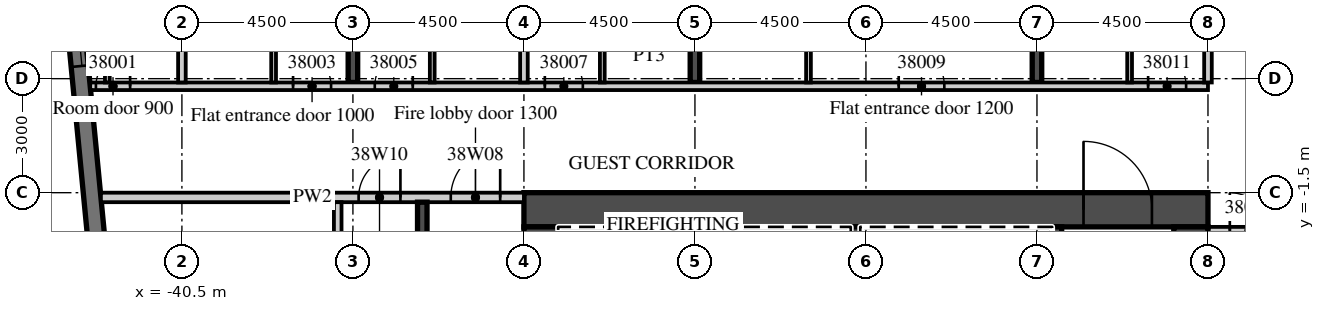
"""IFC4 building model, lengths in metres.
Left out: names, types, materials, properties, quantities, classifications, styles, units other than length and angle.
Written with IfcOpenShell. Run it as: python <this file> out.ifc"""

import sys

from ifc_helpers import new_model, si_unit, direction, frame, frame_2d, origin, place, context, subcontext, project, spatial, rectangle, extrude, element, fill, save


model = new_model("IFC4")
c1 = context("Model", 3, precision=1e-05, world=origin(), true_north=direction((0.0, 1.0)))
c2 = subcontext(c1, "Body", "Model", "MODEL_VIEW")
j1 = project(units=[si_unit("LENGTHUNIT", "METRE"), si_unit("PLANEANGLEUNIT", "RADIAN")], contexts=[c1])
p1 = place(None, origin())
s1 = spatial("IfcSite", under=j1, at=p1, CompositionType="ELEMENT")
p2 = place(p1, origin())
s2 = spatial("IfcBuilding", under=s1, at=p2, CompositionType="ELEMENT")
p3 = place(p2, frame((0.0, 0.0, 166.9)))
s3 = spatial("IfcBuildingStorey", under=s2, at=p3, CompositionType="ELEMENT", Elevation=166.9)
p4 = place(p3, frame((-36.0, 1.4, 0.0), z_axis=(0.0, 0.0, 1.0), x_axis=(0.0, 1.0, 0.0)))
e1 = element("IfcWall", 1, at=p4, inside=s3, PredefinedType="SHEAR", context=c2, shape_type="SweptSolid", body=[
    extrude(rectangle(XDim=15.401, YDim=0.25, at=frame_2d((7.701, 0.0))), origin(), (0.0, 0.0, 1.0), 3.3),
])
p5 = place(p3, frame((-27.0, 1.4, 0.0), z_axis=(0.0, 0.0, 1.0), x_axis=(0.0, 1.0, 0.0)))
e2 = element("IfcWall", 2, at=p5, inside=s3, PredefinedType="SHEAR", context=c2, shape_type="SweptSolid", body=[
    extrude(rectangle(XDim=16.268, YDim=0.25, at=frame_2d((8.134, 0.0))), origin(), (0.0, 0.0, 1.0), 3.3),
])
p6 = place(p3, frame((-18.0, 1.4, 0.0), z_axis=(0.0, 0.0, 1.0), x_axis=(0.0, 1.0, 0.0)))
e3 = element("IfcWall", 3, at=p6, inside=s3, PredefinedType="SHEAR", context=c2, shape_type="SweptSolid", body=[
    extrude(rectangle(XDim=17.134, YDim=0.25, at=frame_2d((8.567, 0.0))), origin(), (0.0, 0.0, 1.0), 3.3),
])
p7 = place(p3, frame((-44.214, 12.466, 0.0), z_axis=(0.0, 0.0, 1.0), x_axis=(0.095847314626, -0.995396047952, 0.0)))
e4 = element("IfcWall", 4, at=p7, inside=s3, PredefinedType="SOLIDWALL", context=c2, shape_type="SweptSolid", body=[
    extrude(rectangle(XDim=34.0, YDim=0.45, at=frame_2d((17.0, 0.0))), origin(), (0.0, 0.0, 1.0), 3.02),
])
p8 = place(p7, frame((2.865, 0.0, 0.45)))
e5 = element("IfcOpeningElement", 5, at=p8, cuts=e4, PredefinedType="OPENING", context=c2, shape_type="SweptSolid", body=[
    extrude(rectangle(XDim=3.3, YDim=2.25, at=frame_2d((1.65, 1.125))), frame((0.0, 0.235, 0.0), z_axis=(0.0, -1.0, 0.0), x_axis=(1.0, 0.0, 0.0)), (0.0, 0.0, 1.0), 0.47),
])
p9 = place(p7, frame((7.386, 0.0, 0.45)))
e6 = element("IfcOpeningElement", 6, at=p9, cuts=e4, PredefinedType="OPENING", context=c2, shape_type="SweptSolid", body=[
    extrude(rectangle(XDim=3.3, YDim=2.25, at=frame_2d((1.65, 1.125))), frame((0.0, 0.235, 0.0), z_axis=(0.0, -1.0, 0.0), x_axis=(1.0, 0.0, 0.0)), (0.0, 0.0, 1.0), 0.47),
])
p10 = place(p3, frame((-42.913, 1.3, 0.0), z_axis=(0.0, 0.0, 1.0), x_axis=(1.0, 0.0, 0.0)))
e7 = element("IfcWall", 7, at=p10, inside=s3, PredefinedType="PARTITIONING", context=c2, shape_type="SweptSolid", body=[
    extrude(rectangle(XDim=29.413, YDim=0.2, at=frame_2d((14.707, 0.0))), origin(), (0.0, 0.0, 1.0), 3.02),
])
p11 = place(p10, frame((0.15, 0.0, 0.0)))
e8 = element("IfcOpeningElement", 8, at=p11, cuts=e7, PredefinedType="OPENING", context=c2, shape_type="SweptSolid", body=[
    extrude(rectangle(XDim=0.9, YDim=2.1, at=frame_2d((0.45, 1.05))), frame((0.0, 0.11, 0.0), z_axis=(0.0, -1.0, 0.0), x_axis=(1.0, 0.0, 0.0)), (0.0, 0.0, 1.0), 0.22),
])
p12 = place(p10, frame((5.338, 0.0, 0.0)))
e9 = element("IfcOpeningElement", 9, at=p12, cuts=e7, PredefinedType="OPENING", context=c2, shape_type="SweptSolid", body=[
    extrude(rectangle(XDim=1.0, YDim=2.1, at=frame_2d((0.5, 1.05))), frame((0.0, 0.11, 0.0), z_axis=(0.0, -1.0, 0.0), x_axis=(1.0, 0.0, 0.0)), (0.0, 0.0, 1.0), 0.22),
])
p13 = place(p10, frame((7.488, 0.0, 0.0)))
e10 = element("IfcOpeningElement", 10, at=p13, cuts=e7, PredefinedType="OPENING", context=c2, shape_type="SweptSolid", body=[
    extrude(rectangle(XDim=1.0, YDim=2.1, at=frame_2d((0.5, 1.05))), frame((0.0, 0.11, 0.0), z_axis=(0.0, -1.0, 0.0), x_axis=(1.0, 0.0, 0.0)), (0.0, 0.0, 1.0), 0.22),
])
p14 = place(p10, frame((11.963, 0.0, 0.0)))
e11 = element("IfcOpeningElement", 11, at=p14, cuts=e7, PredefinedType="OPENING", context=c2, shape_type="SweptSolid", body=[
    extrude(rectangle(XDim=1.0, YDim=2.1, at=frame_2d((0.5, 1.05))), frame((0.0, 0.11, 0.0), z_axis=(0.0, -1.0, 0.0), x_axis=(1.0, 0.0, 0.0)), (0.0, 0.0, 1.0), 0.22),
])
p15 = place(p10, frame((21.275, 0.0, 0.0)))
e12 = element("IfcOpeningElement", 12, at=p15, cuts=e7, PredefinedType="OPENING", context=c2, shape_type="SweptSolid", body=[
    extrude(rectangle(XDim=1.2, YDim=2.1, at=frame_2d((0.6, 1.05))), frame((0.0, 0.11, 0.0), z_axis=(0.0, -1.0, 0.0), x_axis=(1.0, 0.0, 0.0)), (0.0, 0.0, 1.0), 0.22),
])
p16 = place(p10, frame((27.838, 0.0, 0.0)))
e13 = element("IfcOpeningElement", 13, at=p16, cuts=e7, PredefinedType="OPENING", context=c2, shape_type="SweptSolid", body=[
    extrude(rectangle(XDim=1.0, YDim=2.1, at=frame_2d((0.5, 1.05))), frame((0.0, 0.11, 0.0), z_axis=(0.0, -1.0, 0.0), x_axis=(1.0, 0.0, 0.0)), (0.0, 0.0, 1.0), 0.22),
])
p17 = place(p3, frame((-40.5, 1.4, 0.0), z_axis=(0.0, 0.0, 1.0), x_axis=(0.0, 1.0, 0.0)))
e14 = element("IfcWall", 14, at=p17, inside=s3, PredefinedType="PARTITIONING", context=c2, shape_type="SweptSolid", body=[
    extrude(rectangle(XDim=14.99, YDim=0.2, at=frame_2d((7.495, 0.0))), origin(), (0.0, 0.0, 1.0), 3.02),
])
p18 = place(p3, frame((-42.462, 1.4, 0.0), z_axis=(0.0, 0.0, 1.0), x_axis=(0.0, 1.0, 0.0)))
e15 = element("IfcWall", 15, at=p18, inside=s3, PredefinedType="PARTITIONING", context=c2, shape_type="SweptSolid", body=[
    extrude(rectangle(XDim=4.028, YDim=0.125, at=frame_2d((2.014, 0.0))), origin(), (0.0, 0.0, 1.0), 3.02),
])
p19 = place(p18, frame((2.45, 0.0, 0.0)))
e16 = element("IfcOpeningElement", 16, at=p19, cuts=e15, PredefinedType="OPENING", context=c2, shape_type="SweptSolid", body=[
    extrude(rectangle(XDim=0.9, YDim=2.1, at=frame_2d((0.45, 1.05))), frame((0.0, 0.073, 0.0), z_axis=(0.0, -1.0, 0.0), x_axis=(1.0, 0.0, 0.0)), (0.0, 0.0, 1.0), 0.145),
])
p20 = place(p3, frame((-38.087, 1.4, 0.0), z_axis=(0.0, 0.0, 1.0), x_axis=(0.0, 1.0, 0.0)))
e17 = element("IfcWall", 17, at=p20, inside=s3, PredefinedType="PARTITIONING", context=c2, shape_type="SweptSolid", body=[
    extrude(rectangle(XDim=5.725, YDim=0.125, at=frame_2d((2.863, 0.0))), origin(), (0.0, 0.0, 1.0), 3.02),
])
p21 = place(p20, frame((2.45, 0.0, 0.0)))
e18 = element("IfcOpeningElement", 18, at=p21, cuts=e17, PredefinedType="OPENING", context=c2, shape_type="SweptSolid", body=[
    extrude(rectangle(XDim=0.9, YDim=2.1, at=frame_2d((0.45, 1.05))), frame((0.0, 0.073, 0.0), z_axis=(0.0, -1.0, 0.0), x_axis=(1.0, 0.0, 0.0)), (0.0, 0.0, 1.0), 0.145),
])
p22 = place(p3, frame((-31.5, 1.4, 0.0), z_axis=(0.0, 0.0, 1.0), x_axis=(0.0, 1.0, 0.0)))
e19 = element("IfcWall", 19, at=p22, inside=s3, PredefinedType="PARTITIONING", context=c2, shape_type="SweptSolid", body=[
    extrude(rectangle(XDim=15.856, YDim=0.2, at=frame_2d((7.928, 0.0))), origin(), (0.0, 0.0, 1.0), 3.02),
])
p23 = place(p3, frame((-33.913, 1.4, 0.0), z_axis=(0.0, 0.0, 1.0), x_axis=(0.0, 1.0, 0.0)))
e20 = element("IfcWall", 20, at=p23, inside=s3, PredefinedType="PARTITIONING", context=c2, shape_type="SweptSolid", body=[
    extrude(rectangle(XDim=5.725, YDim=0.125, at=frame_2d((2.863, 0.0))), origin(), (0.0, 0.0, 1.0), 3.02),
])
p24 = place(p23, frame((2.45, 0.0, 0.0)))
e21 = element("IfcOpeningElement", 21, at=p24, cuts=e20, PredefinedType="OPENING", context=c2, shape_type="SweptSolid", body=[
    extrude(rectangle(XDim=0.9, YDim=2.1, at=frame_2d((0.45, 1.05))), frame((0.0, 0.073, 0.0), z_axis=(0.0, -1.0, 0.0), x_axis=(1.0, 0.0, 0.0)), (0.0, 0.0, 1.0), 0.145),
])
p25 = place(p3, frame((-29.438, 1.4, 0.0), z_axis=(0.0, 0.0, 1.0), x_axis=(0.0, 1.0, 0.0)))
e22 = element("IfcWall", 22, at=p25, inside=s3, PredefinedType="PARTITIONING", context=c2, shape_type="SweptSolid", body=[
    extrude(rectangle(XDim=5.725, YDim=0.125, at=frame_2d((2.863, 0.0))), origin(), (0.0, 0.0, 1.0), 3.02),
])
p26 = place(p25, frame((2.45, 0.0, 0.0)))
e23 = element("IfcOpeningElement", 23, at=p26, cuts=e22, PredefinedType="OPENING", context=c2, shape_type="SweptSolid", body=[
    extrude(rectangle(XDim=0.9, YDim=2.1, at=frame_2d((0.45, 1.05))), frame((0.0, 0.073, 0.0), z_axis=(0.0, -1.0, 0.0), x_axis=(1.0, 0.0, 0.0)), (0.0, 0.0, 1.0), 0.145),
])
p27 = place(p3, frame((-24.012, 1.4, 0.0), z_axis=(0.0, 0.0, 1.0), x_axis=(0.0, 1.0, 0.0)))
e24 = element("IfcWall", 24, at=p27, inside=s3, PredefinedType="PARTITIONING", context=c2, shape_type="SweptSolid", body=[
    extrude(rectangle(XDim=5.725, YDim=0.125, at=frame_2d((2.863, 0.0))), origin(), (0.0, 0.0, 1.0), 3.02),
])
p28 = place(p27, frame((2.45, 0.0, 0.0)))
e25 = element("IfcOpeningElement", 25, at=p28, cuts=e24, PredefinedType="OPENING", context=c2, shape_type="SweptSolid", body=[
    extrude(rectangle(XDim=0.9, YDim=2.1, at=frame_2d((0.45, 1.05))), frame((0.0, 0.073, 0.0), z_axis=(0.0, -1.0, 0.0), x_axis=(1.0, 0.0, 0.0)), (0.0, 0.0, 1.0), 0.145),
])
p29 = place(p3, frame((-13.5, 1.4, 0.0), z_axis=(0.0, 0.0, 1.0), x_axis=(0.0, 1.0, 0.0)))
e26 = element("IfcWall", 26, at=p29, inside=s3, PredefinedType="PARTITIONING", context=c2, shape_type="SweptSolid", body=[
    extrude(rectangle(XDim=17.59, YDim=0.2, at=frame_2d((8.795, 0.0))), origin(), (0.0, 0.0, 1.0), 3.02),
])
p30 = place(p3, frame((-15.562, 1.4, 0.0), z_axis=(0.0, 0.0, 1.0), x_axis=(0.0, 1.0, 0.0)))
e27 = element("IfcWall", 27, at=p30, inside=s3, PredefinedType="PARTITIONING", context=c2, shape_type="SweptSolid", body=[
    extrude(rectangle(XDim=5.725, YDim=0.125, at=frame_2d((2.863, 0.0))), origin(), (0.0, 0.0, 1.0), 3.02),
])
p31 = place(p30, frame((2.45, 0.0, 0.0)))
e28 = element("IfcOpeningElement", 28, at=p31, cuts=e27, PredefinedType="OPENING", context=c2, shape_type="SweptSolid", body=[
    extrude(rectangle(XDim=0.9, YDim=2.1, at=frame_2d((0.45, 1.05))), frame((0.0, 0.073, 0.0), z_axis=(0.0, -1.0, 0.0), x_axis=(1.0, 0.0, 0.0)), (0.0, 0.0, 1.0), 0.145),
])
p32 = place(p3, frame((-13.5, -2.5, 0.0), z_axis=(0.0, 0.0, 1.0), x_axis=(1.0, 0.0, 0.0)))
e29 = element("IfcWall", 29, at=p32, inside=s3, PredefinedType="PARTITIONING", context=c2, shape_type="SweptSolid", body=[
    extrude(rectangle(XDim=27.0, YDim=0.2, at=frame_2d((13.5, 0.0))), origin(), (0.0, 0.0, 1.0), 3.02),
])
p33 = place(p32, frame((0.575, 0.0, 0.0)))
e30 = element("IfcOpeningElement", 30, at=p33, cuts=e29, PredefinedType="OPENING", context=c2, shape_type="SweptSolid", body=[
    extrude(rectangle(XDim=1.0, YDim=2.1, at=frame_2d((0.5, 1.05))), frame((0.0, 0.11, 0.0), z_axis=(0.0, -1.0, 0.0), x_axis=(1.0, 0.0, 0.0)), (0.0, 0.0, 1.0), 0.22),
])
p34 = place(p32, frame((9.863, 0.0, 0.0)))
e31 = element("IfcOpeningElement", 31, at=p34, cuts=e29, PredefinedType="OPENING", context=c2, shape_type="SweptSolid", body=[
    extrude(rectangle(XDim=1.2, YDim=2.1, at=frame_2d((0.6, 1.05))), frame((0.0, 0.11, 0.0), z_axis=(0.0, -1.0, 0.0), x_axis=(1.0, 0.0, 0.0)), (0.0, 0.0, 1.0), 0.22),
])
p35 = place(p32, frame((15.938, 0.0, 0.0)))
e32 = element("IfcOpeningElement", 32, at=p35, cuts=e29, PredefinedType="OPENING", context=c2, shape_type="SweptSolid", body=[
    extrude(rectangle(XDim=1.2, YDim=2.1, at=frame_2d((0.6, 1.05))), frame((0.0, 0.11, 0.0), z_axis=(0.0, -1.0, 0.0), x_axis=(1.0, 0.0, 0.0)), (0.0, 0.0, 1.0), 0.22),
])
p36 = place(p32, frame((23.075, 0.0, 0.0)))
e33 = element("IfcOpeningElement", 33, at=p36, cuts=e29, PredefinedType="OPENING", context=c2, shape_type="SweptSolid", body=[
    extrude(rectangle(XDim=1.0, YDim=2.1, at=frame_2d((0.5, 1.05))), frame((0.0, 0.11, 0.0), z_axis=(0.0, -1.0, 0.0), x_axis=(1.0, 0.0, 0.0)), (0.0, 0.0, 1.0), 0.22),
])
p37 = place(p3, frame((-31.5, -1.95, 0.0), z_axis=(0.0, 0.0, 1.0), x_axis=(1.0, 0.0, 0.0)))
e34 = element("IfcWall", 34, at=p37, inside=s3, PredefinedType="SHEAR", context=c2, shape_type="SweptSolid", body=[
    extrude(rectangle(XDim=18.0, YDim=0.9, at=frame_2d((9.0, 0.0))), origin(), (0.0, 0.0, 1.0), 3.02),
])
p38 = place(p37, frame((14.725, 0.0, 0.0)))
e35 = element("IfcOpeningElement", 35, at=p38, cuts=e34, PredefinedType="OPENING", context=c2, shape_type="SweptSolid", body=[
    extrude(rectangle(XDim=1.8, YDim=2.1, at=frame_2d((0.9, 1.05))), frame((0.0, 0.46, 0.0), z_axis=(0.0, -1.0, 0.0), x_axis=(1.0, 0.0, 0.0)), (0.0, 0.0, 1.0), 0.92),
])
p39 = place(p3, frame((-31.05, -15.2, 0.0), z_axis=(0.0, 0.0, 1.0), x_axis=(0.0, 1.0, 0.0)))
e36 = element("IfcWall", 36, at=p39, inside=s3, PredefinedType="SHEAR", context=c2, shape_type="SweptSolid", body=[
    extrude(rectangle(XDim=12.8, YDim=0.9, at=frame_2d((6.4, 0.0))), origin(), (0.0, 0.0, 1.0), 3.02),
])
p40 = place(p39, frame((11.5, 0.0, 0.0)))
e37 = element("IfcOpeningElement", 37, at=p40, cuts=e36, PredefinedType="OPENING", context=c2, shape_type="SweptSolid", body=[
    extrude(rectangle(XDim=1.1, YDim=2.1, at=frame_2d((0.55, 1.05))), frame((0.0, 0.46, 0.0), z_axis=(0.0, -1.0, 0.0), x_axis=(1.0, 0.0, 0.0)), (0.0, 0.0, 1.0), 0.92),
])
p41 = place(p3, frame((-13.95, -14.6, 0.0), z_axis=(0.0, 0.0, 1.0), x_axis=(0.0, 1.0, 0.0)))
e38 = element("IfcWall", 38, at=p41, inside=s3, PredefinedType="SHEAR", context=c2, shape_type="SweptSolid", body=[
    extrude(rectangle(XDim=12.2, YDim=0.9, at=frame_2d((6.1, 0.0))), origin(), (0.0, 0.0, 1.0), 3.02),
])
p42 = place(p3, frame((-17.475, -5.55, 0.0), z_axis=(0.0, 0.0, 1.0), x_axis=(0.0, 1.0, 0.0)))
e39 = element("IfcWall", 39, at=p42, inside=s3, PredefinedType="SHEAR", context=c2, shape_type="SweptSolid", body=[
    extrude(rectangle(XDim=3.15, YDim=0.25, at=frame_2d((1.575, 0.0))), origin(), (0.0, 0.0, 1.0), 3.02),
])
for number, where, z_axis, x_axis in (
    (40, (-27.975, -5.3, 0.0), (0.0, 0.0, 1.0), (0.0, 1.0, 0.0)),
    (41, (-22.775, -5.3, 0.0), (0.0, 0.0, 1.0), (0.0, 1.0, 0.0)),
):
    element("IfcWall", number, at=place(p3, frame(where, z_axis=z_axis, x_axis=x_axis)), inside=s3, PredefinedType="SHEAR", context=c2, shape_type="SweptSolid", body=[
        extrude(rectangle(XDim=2.9, YDim=0.25, at=frame_2d((1.45, 0.0))), origin(), (0.0, 0.0, 1.0), 3.02),
    ])
p43 = place(p3, frame((-42.632, -1.625, 0.0), z_axis=(0.0, 0.0, 1.0), x_axis=(1.0, 0.0, 0.0)))
e42 = element("IfcWall", 42, at=p43, inside=s3, PredefinedType="PARTITIONING", context=c2, shape_type="SweptSolid", body=[
    extrude(rectangle(XDim=11.132, YDim=0.25, at=frame_2d((5.566, 0.0))), origin(), (0.0, 0.0, 1.0), 3.02),
])
p44 = place(p43, frame((9.207, 0.0, 0.0)))
e43 = element("IfcOpeningElement", 43, at=p44, cuts=e42, PredefinedType="OPENING", context=c2, shape_type="SweptSolid", body=[
    extrude(rectangle(XDim=1.3, YDim=2.1, at=frame_2d((0.65, 1.05))), frame((0.0, 0.135, 0.0), z_axis=(0.0, -1.0, 0.0), x_axis=(1.0, 0.0, 0.0)), (0.0, 0.0, 1.0), 0.27),
])
p45 = place(p43, frame((6.781, 0.0, 0.0)))
e44 = element("IfcOpeningElement", 44, at=p45, cuts=e42, PredefinedType="OPENING", context=c2, shape_type="SweptSolid", body=[
    extrude(rectangle(XDim=1.1, YDim=2.1, at=frame_2d((0.55, 1.05))), frame((0.0, 0.135, 0.0), z_axis=(0.0, -1.0, 0.0), x_axis=(1.0, 0.0, 0.0)), (0.0, 0.0, 1.0), 0.27),
])
p46 = place(p3, frame((-34.175, -10.1, 0.0), z_axis=(0.0, 0.0, 1.0), x_axis=(0.0, 1.0, 0.0)))
e45 = element("IfcWall", 45, at=p46, inside=s3, PredefinedType="SHEAR", context=c2, shape_type="SweptSolid", body=[
    extrude(rectangle(XDim=8.35, YDim=0.25, at=frame_2d((4.175, 0.0))), origin(), (0.0, 0.0, 1.0), 3.02),
])
p47 = place(p3, frame((-36.4, -17.7, 0.0), z_axis=(0.0, 0.0, 1.0), x_axis=(0.0, 1.0, 0.0)))
e46 = element("IfcWall", 46, at=p47, inside=s3, PredefinedType="PARTITIONING", context=c2, shape_type="SweptSolid", body=[
    extrude(rectangle(XDim=15.95, YDim=0.2, at=frame_2d((7.975, 0.0))), origin(), (0.0, 0.0, 1.0), 3.02),
])
p48 = place(p47, frame((0.35, 0.0, 0.0)))
e47 = element("IfcOpeningElement", 47, at=p48, cuts=e46, PredefinedType="OPENING", context=c2, shape_type="SweptSolid", body=[
    extrude(rectangle(XDim=0.9, YDim=2.1, at=frame_2d((0.45, 1.05))), frame((0.0, 0.11, 0.0), z_axis=(0.0, -1.0, 0.0), x_axis=(1.0, 0.0, 0.0)), (0.0, 0.0, 1.0), 0.22),
])
p49 = place(p9, origin())
e48 = element("IfcWindow", 48, at=p49, inside=s3, PartitioningType="SINGLE_PANEL", PredefinedType="WINDOW", context=c2, shape_type="SweptSolid", body=[
    extrude(rectangle(XDim=3.3, YDim=2.25, at=frame_2d((1.65, 1.125))), frame((0.0, 0.09, 0.0), z_axis=(0.0, -1.0, 0.0), x_axis=(1.0, 0.0, 0.0)), (0.0, 0.0, 1.0), 0.06),
])
fill(e6, e48)
p50 = place(p11, origin())
e49 = element("IfcDoor", 49, at=p50, inside=s3, OperationType="SINGLE_SWING_RIGHT", PredefinedType="DOOR", context=c2, shape_type="SweptSolid", body=[
    extrude(rectangle(XDim=0.9, YDim=2.1, at=frame_2d((0.45, 1.05))), frame((0.0, 0.025, 0.0), z_axis=(0.0, -1.0, 0.0), x_axis=(1.0, 0.0, 0.0)), (0.0, 0.0, 1.0), 0.05),
])
fill(e8, e49)
p51 = place(p12, origin())
e50 = element("IfcDoor", 50, at=p51, inside=s3, OperationType="SINGLE_SWING_LEFT", PredefinedType="DOOR", context=c2, shape_type="SweptSolid", body=[
    extrude(rectangle(XDim=1.0, YDim=2.1, at=frame_2d((0.5, 1.05))), frame((0.0, 0.025, 0.0), z_axis=(0.0, -1.0, 0.0), x_axis=(1.0, 0.0, 0.0)), (0.0, 0.0, 1.0), 0.05),
])
fill(e9, e50)
p52 = place(p13, origin())
e51 = element("IfcDoor", 51, at=p52, inside=s3, OperationType="SINGLE_SWING_RIGHT", PredefinedType="DOOR", context=c2, shape_type="SweptSolid", body=[
    extrude(rectangle(XDim=1.0, YDim=2.1, at=frame_2d((0.5, 1.05))), frame((0.0, 0.025, 0.0), z_axis=(0.0, -1.0, 0.0), x_axis=(1.0, 0.0, 0.0)), (0.0, 0.0, 1.0), 0.05),
])
fill(e10, e51)
p53 = place(p14, origin())
e52 = element("IfcDoor", 52, at=p53, inside=s3, OperationType="SINGLE_SWING_LEFT", PredefinedType="DOOR", context=c2, shape_type="SweptSolid", body=[
    extrude(rectangle(XDim=1.0, YDim=2.1, at=frame_2d((0.5, 1.05))), frame((0.0, 0.025, 0.0), z_axis=(0.0, -1.0, 0.0), x_axis=(1.0, 0.0, 0.0)), (0.0, 0.0, 1.0), 0.05),
])
fill(e11, e52)
p54 = place(p15, origin())
e53 = element("IfcDoor", 53, at=p54, inside=s3, OperationType="SINGLE_SWING_LEFT", PredefinedType="DOOR", context=c2, shape_type="SweptSolid", body=[
    extrude(rectangle(XDim=1.2, YDim=2.1, at=frame_2d((0.6, 1.05))), frame((0.0, 0.025, 0.0), z_axis=(0.0, -1.0, 0.0), x_axis=(1.0, 0.0, 0.0)), (0.0, 0.0, 1.0), 0.05),
])
fill(e12, e53)
p55 = place(p16, origin())
e54 = element("IfcDoor", 54, at=p55, inside=s3, OperationType="SINGLE_SWING_LEFT", PredefinedType="DOOR", context=c2, shape_type="SweptSolid", body=[
    extrude(rectangle(XDim=1.0, YDim=2.1, at=frame_2d((0.5, 1.05))), frame((0.0, 0.025, 0.0), z_axis=(0.0, -1.0, 0.0), x_axis=(1.0, 0.0, 0.0)), (0.0, 0.0, 1.0), 0.05),
])
fill(e13, e54)
p56 = place(p33, origin())
e55 = element("IfcDoor", 55, at=p56, inside=s3, OperationType="SINGLE_SWING_LEFT", PredefinedType="DOOR", context=c2, shape_type="SweptSolid", body=[
    extrude(rectangle(XDim=1.0, YDim=2.1, at=frame_2d((0.5, 1.05))), frame((0.0, 0.025, 0.0), z_axis=(0.0, -1.0, 0.0), x_axis=(1.0, 0.0, 0.0)), (0.0, 0.0, 1.0), 0.05),
])
fill(e30, e55)
p57 = place(p38, origin())
e56 = element("IfcDoor", 56, at=p57, inside=s3, OperationType="DOUBLE_DOOR_DOUBLE_SWING", PredefinedType="DOOR", context=c2, shape_type="SweptSolid", body=[
    extrude(rectangle(XDim=1.8, YDim=2.1, at=frame_2d((0.9, 1.05))), frame((0.0, 0.025, 0.0), z_axis=(0.0, -1.0, 0.0), x_axis=(1.0, 0.0, 0.0)), (0.0, 0.0, 1.0), 0.05),
])
fill(e35, e56)
p58 = place(p44, origin())
e57 = element("IfcDoor", 57, at=p58, inside=s3, OperationType="SINGLE_SWING_RIGHT", PredefinedType="DOOR", context=c2, shape_type="SweptSolid", body=[
    extrude(rectangle(XDim=1.3, YDim=2.1, at=frame_2d((0.65, 1.05))), frame((0.0, 0.025, 0.0), z_axis=(0.0, -1.0, 0.0), x_axis=(1.0, 0.0, 0.0)), (0.0, 0.0, 1.0), 0.05),
])
fill(e43, e57)
p59 = place(p45, origin())
e58 = element("IfcDoor", 58, at=p59, inside=s3, OperationType="SINGLE_SWING_RIGHT", PredefinedType="DOOR", context=c2, shape_type="SweptSolid", body=[
    extrude(rectangle(XDim=1.1, YDim=2.1, at=frame_2d((0.55, 1.05))), frame((0.0, 0.025, 0.0), z_axis=(0.0, -1.0, 0.0), x_axis=(1.0, 0.0, 0.0)), (0.0, 0.0, 1.0), 0.05),
])
fill(e44, e58)
save(model, sys.argv[1])
